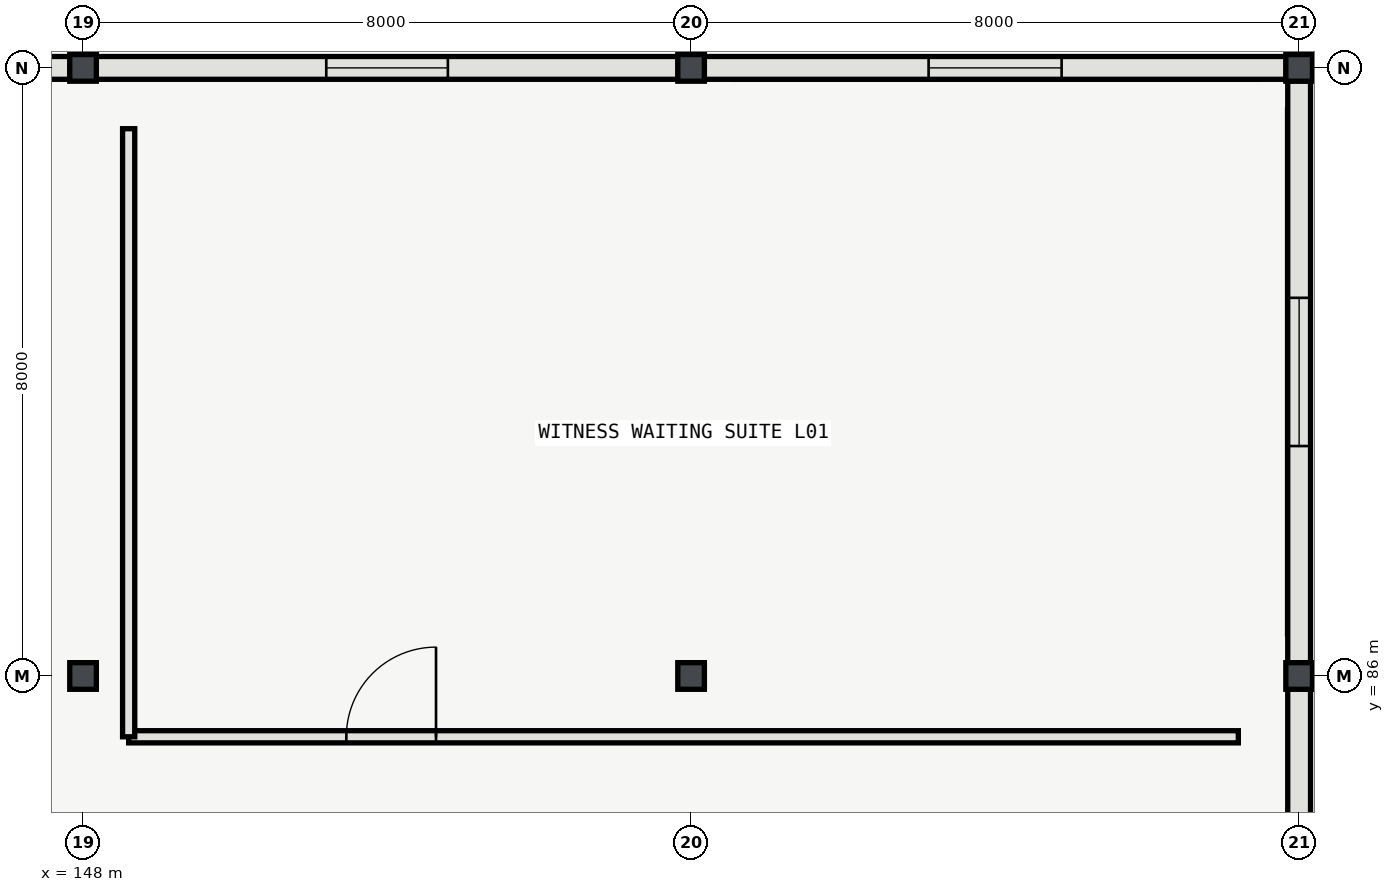
"""IFC4 building model, lengths in metres.
Left out: names, types, materials, properties, quantities, classifications, styles, units other than length and angle.
Written with IfcOpenShell. Run it as: python <this file> out.ifc"""

import sys

from ifc_helpers import new_model, si_unit, direction, frame, frame_2d, origin, origin_2d, place, context, subcontext, project, spatial, rectangle, i_section, extrude, element, fill, save


model = new_model("IFC4")
c1 = context("Model", 3, precision=1e-05, world=origin(), true_north=direction((0.0, 1.0)))
c2 = subcontext(c1, "Body", "Model", "MODEL_VIEW")
j1 = project(units=[si_unit("LENGTHUNIT", "METRE"), si_unit("PLANEANGLEUNIT", "RADIAN")], contexts=[c1])
p1 = place(None, origin())
s1 = spatial("IfcSite", under=j1, at=p1, CompositionType="ELEMENT")
p2 = place(p1, origin())
s2 = spatial("IfcBuilding", under=s1, at=p2, CompositionType="ELEMENT")
p3 = place(p2, frame((0.0, 0.0, 5.4)))
s3 = spatial("IfcBuildingStorey", under=s2, at=p3, CompositionType="ELEMENT", Elevation=5.4)
for number, where, z_axis, x_axis in (
    (1, (148.0, 86.0, 0.0), (0.0, 0.0, 1.0), (1.0, 0.0, 0.0)),
    (2, (148.0, 94.0, 0.0), (0.0, 0.0, 1.0), (1.0, 0.0, 0.0)),
    (3, (156.0, 86.0, 0.0), (0.0, 0.0, 1.0), (1.0, 0.0, 0.0)),
    (4, (156.0, 94.0, 0.0), (0.0, 0.0, 1.0), (1.0, 0.0, 0.0)),
    (5, (164.0, 86.0, 0.0), (0.0, 0.0, 1.0), (1.0, 0.0, 0.0)),
    (6, (164.0, 94.0, 0.0), (0.0, 0.0, 1.0), (1.0, 0.0, 0.0)),
):
    element("IfcColumn", number, at=place(p3, frame(where, z_axis=z_axis, x_axis=x_axis)), inside=s3, PredefinedType="COLUMN", context=c2, shape_type="SweptSolid", body=[
        extrude(i_section(OverallWidth=0.35, OverallDepth=0.35, WebThickness=0.012, FlangeThickness=0.019, FilletRadius=0.02, at=origin_2d()), origin(), (0.0, 0.0, 1.0), 5.4),
    ])
p4 = place(p3, frame((147.829, 94.0, 0.0), z_axis=(0.0, 0.0, 1.0), x_axis=(-1.0, 0.0, 0.0)))
e7 = element("IfcWall", 7, at=p4, inside=s3, PredefinedType="SOLIDWALL", context=c2, shape_type="SweptSolid", body=[
    extrude(rectangle(XDim=7.658, YDim=0.3, at=frame_2d((3.829, 0.0))), origin(), (0.0, 0.0, 1.0), 4.803),
])
p5 = place(p4, frame((3.129, 0.0, 0.95)))
e8 = element("IfcOpeningElement", 8, at=p5, cuts=e7, PredefinedType="OPENING", context=c2, shape_type="SweptSolid", body=[
    extrude(rectangle(XDim=1.4, YDim=1.6, at=frame_2d((0.7, 0.8))), frame((0.0, 0.16, 0.0), z_axis=(0.0, -1.0, 0.0), x_axis=(1.0, 0.0, 0.0)), (0.0, 0.0, 1.0), 0.32),
])
p6 = place(p3, frame((155.829, 94.0, 0.0), z_axis=(0.0, 0.0, 1.0), x_axis=(-1.0, 0.0, 0.0)))
e9 = element("IfcWall", 9, at=p6, inside=s3, PredefinedType="SOLIDWALL", context=c2, shape_type="SweptSolid", body=[
    extrude(rectangle(XDim=7.658, YDim=0.3, at=frame_2d((3.829, 0.0))), origin(), (0.0, 0.0, 1.0), 4.803),
])
p7 = place(p6, frame((3.029, 0.0, 0.95)))
e10 = element("IfcOpeningElement", 10, at=p7, cuts=e9, PredefinedType="OPENING", context=c2, shape_type="SweptSolid", body=[
    extrude(rectangle(XDim=1.6, YDim=1.6, at=frame_2d((0.8, 0.8))), frame((0.0, 0.16, 0.0), z_axis=(0.0, -1.0, 0.0), x_axis=(1.0, 0.0, 0.0)), (0.0, 0.0, 1.0), 0.32),
])
p8 = place(p3, frame((163.829, 94.0, 0.0), z_axis=(0.0, 0.0, 1.0), x_axis=(-1.0, 0.0, 0.0)))
e11 = element("IfcWall", 11, at=p8, inside=s3, PredefinedType="SOLIDWALL", context=c2, shape_type="SweptSolid", body=[
    extrude(rectangle(XDim=7.658, YDim=0.3, at=frame_2d((3.829, 0.0))), origin(), (0.0, 0.0, 1.0), 4.803),
])
p9 = place(p8, frame((2.954, 0.0, 0.95)))
e12 = element("IfcOpeningElement", 12, at=p9, cuts=e11, PredefinedType="OPENING", context=c2, shape_type="SweptSolid", body=[
    extrude(rectangle(XDim=1.75, YDim=1.6, at=frame_2d((0.875, 0.8))), frame((0.0, 0.16, 0.0), z_axis=(0.0, -1.0, 0.0), x_axis=(1.0, 0.0, 0.0)), (0.0, 0.0, 1.0), 0.32),
])
p10 = place(p3, frame((164.0, 78.171, 0.0), z_axis=(0.0, 0.0, 1.0), x_axis=(0.0, 1.0, 0.0)))
e13 = element("IfcWall", 13, at=p10, inside=s3, PredefinedType="SOLIDWALL", context=c2, shape_type="SweptSolid", body=[
    extrude(rectangle(XDim=7.658, YDim=0.3, at=frame_2d((3.829, 0.0))), origin(), (0.0, 0.0, 1.0), 4.503),
])
p11 = place(p10, frame((2.979, 0.0, 0.95)))
e14 = element("IfcOpeningElement", 14, at=p11, cuts=e13, PredefinedType="OPENING", context=c2, shape_type="SweptSolid", body=[
    extrude(rectangle(XDim=1.7, YDim=1.95, at=frame_2d((0.85, 0.975))), frame((0.0, 0.16, 0.0), z_axis=(0.0, -1.0, 0.0), x_axis=(1.0, 0.0, 0.0)), (0.0, 0.0, 1.0), 0.32),
])
p12 = place(p3, frame((164.0, 86.171, 0.0), z_axis=(0.0, 0.0, 1.0), x_axis=(0.0, 1.0, 0.0)))
e15 = element("IfcWall", 15, at=p12, inside=s3, PredefinedType="SOLIDWALL", context=c2, shape_type="SweptSolid", body=[
    extrude(rectangle(XDim=7.658, YDim=0.3, at=frame_2d((3.829, 0.0))), origin(), (0.0, 0.0, 1.0), 4.503),
])
p13 = place(p12, frame((2.854, 0.0, 0.95)))
e16 = element("IfcOpeningElement", 16, at=p13, cuts=e15, PredefinedType="OPENING", context=c2, shape_type="SweptSolid", body=[
    extrude(rectangle(XDim=1.95, YDim=1.95, at=frame_2d((0.975, 0.975))), frame((0.0, 0.16, 0.0), z_axis=(0.0, -1.0, 0.0), x_axis=(1.0, 0.0, 0.0)), (0.0, 0.0, 1.0), 0.32),
])
p14 = place(p3, frame((148.6, 85.2, 0.0), z_axis=(0.0, 0.0, 1.0), x_axis=(1.0, 0.0, 0.0)))
e17 = element("IfcWall", 17, at=p14, inside=s3, PredefinedType="PARTITIONING", context=c2, shape_type="SweptSolid", body=[
    extrude(rectangle(XDim=14.6, YDim=0.16, at=frame_2d((7.3, 0.0))), origin(), (0.0, 0.0, 1.0), 5.12),
])
p15 = place(p14, frame((2.864, 0.0, 0.0)))
e18 = element("IfcOpeningElement", 18, at=p15, cuts=e17, PredefinedType="OPENING", context=c2, shape_type="SweptSolid", body=[
    extrude(rectangle(XDim=1.18, YDim=2.2, at=frame_2d((0.59, 1.1))), frame((0.0, 0.09, 0.0), z_axis=(0.0, -1.0, 0.0), x_axis=(1.0, 0.0, 0.0)), (0.0, 0.0, 1.0), 0.18),
])
p16 = place(p3, frame((148.6, 93.2, 0.0), z_axis=(0.0, 0.0, 1.0), x_axis=(0.0, -1.0, 0.0)))
e19 = element("IfcWall", 19, at=p16, inside=s3, PredefinedType="PARTITIONING", context=c2, shape_type="SweptSolid", body=[
    extrude(rectangle(XDim=8.0, YDim=0.16, at=frame_2d((4.0, 0.0))), origin(), (0.0, 0.0, 1.0), 5.12),
])
p17 = place(p7, origin())
e20 = element("IfcWindow", 20, at=p17, inside=s3, PartitioningType="SINGLE_PANEL", PredefinedType="WINDOW", context=c2, shape_type="SweptSolid", body=[
    extrude(rectangle(XDim=1.6, YDim=1.6, at=frame_2d((0.8, 0.8))), frame((0.0, 0.03, 0.0), z_axis=(0.0, -1.0, 0.0), x_axis=(1.0, 0.0, 0.0)), (0.0, 0.0, 1.0), 0.06),
])
fill(e10, e20)
p18 = place(p9, origin())
e21 = element("IfcWindow", 21, at=p18, inside=s3, PartitioningType="SINGLE_PANEL", PredefinedType="WINDOW", context=c2, shape_type="SweptSolid", body=[
    extrude(rectangle(XDim=1.75, YDim=1.6, at=frame_2d((0.875, 0.8))), frame((0.0, 0.03, 0.0), z_axis=(0.0, -1.0, 0.0), x_axis=(1.0, 0.0, 0.0)), (0.0, 0.0, 1.0), 0.06),
])
fill(e12, e21)
p19 = place(p13, origin())
e22 = element("IfcWindow", 22, at=p19, inside=s3, PartitioningType="SINGLE_PANEL", PredefinedType="WINDOW", context=c2, shape_type="SweptSolid", body=[
    extrude(rectangle(XDim=1.95, YDim=1.95, at=frame_2d((0.975, 0.975))), frame((0.0, 0.03, 0.0), z_axis=(0.0, -1.0, 0.0), x_axis=(1.0, 0.0, 0.0)), (0.0, 0.0, 1.0), 0.06),
])
fill(e16, e22)
p20 = place(p15, origin())
e23 = element("IfcDoor", 23, at=p20, inside=s3, OperationType="SINGLE_SWING_RIGHT", PredefinedType="DOOR", context=c2, shape_type="SweptSolid", body=[
    extrude(rectangle(XDim=1.18, YDim=2.2, at=frame_2d((0.59, 1.1))), frame((0.0, 0.025, 0.0), z_axis=(0.0, -1.0, 0.0), x_axis=(1.0, 0.0, 0.0)), (0.0, 0.0, 1.0), 0.05),
])
fill(e18, e23)
save(model, sys.argv[1])
